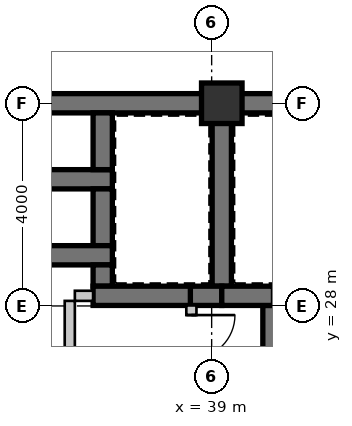
"""IFC4 building model, lengths in metres.
Left out: names, types, materials, properties, quantities, classifications, styles, units other than length and angle.
Written with IfcOpenShell. Run it as: python <this file> out.ifc"""

import sys

from ifc_helpers import new_model, si_unit, direction, frame, frame_2d, origin, origin_2d, place, context, subcontext, project, spatial, rectangle, extrude, source, transform, mapped, element, fill, save


model = new_model("IFC4")
c1 = context("Model", 3, precision=1e-05, world=origin(), true_north=direction((0.0, 1.0)))
c2 = subcontext(c1, "Body", "Model", "MODEL_VIEW")
j1 = project(units=[si_unit("LENGTHUNIT", "METRE"), si_unit("PLANEANGLEUNIT", "RADIAN")], contexts=[c1])
p1 = place(None, origin())
s1 = spatial("IfcSite", under=j1, at=p1, CompositionType="ELEMENT")
p2 = place(p1, origin())
s2 = spatial("IfcBuilding", under=s1, at=p2, CompositionType="ELEMENT")
p3 = place(p2, frame((0.0, 0.0, 26.25)))
s3 = spatial("IfcBuildingStorey", under=s2, at=p3, CompositionType="ELEMENT", Elevation=26.25)
m1 = source(origin(), c2, "Body", "SweptSolid", [
    extrude(rectangle(XDim=0.8, YDim=0.8, at=origin_2d()), origin(), (0.0, 0.0, 1.0), 3.15),
])
p4 = place(p3, frame((39.2, 32.0, 0.0), z_axis=(0.0, 0.0, 1.0), x_axis=(1.0, 0.0, 0.0)))
e1 = element("IfcColumn", 1, at=p4, inside=s3, PredefinedType="COLUMN", context=c2, shape_type="MappedRepresentation", body=[
    mapped(m1, transform((0.0, 0.0, 0.0), scale=1.0)),
])
m2 = source(origin(), c2, "Body", "SweptSolid", [
    extrude(rectangle(XDim=11.2, YDim=0.38, at=frame_2d((5.6, 0.0))), origin(), (0.0, 0.0, 1.0), 2.93),
])
p5 = place(p3, frame((28.0, 32.0, 0.0), z_axis=(0.0, 0.0, 1.0), x_axis=(1.0, 0.0, 0.0)))
e2 = element("IfcWall", 2, at=p5, inside=s3, PredefinedType="SHEAR", context=c2, shape_type="MappedRepresentation", body=[
    mapped(m2, transform((0.0, 0.0, 0.0), scale=1.0)),
])
m3 = source(origin(), c2, "Body", "SweptSolid", [
    extrude(rectangle(XDim=11.99, YDim=0.38, at=frame_2d((5.995, 0.0))), origin(), (0.0, 0.0, 1.0), 2.93),
])
p6 = place(p3, frame((39.2, 32.0, 0.0), z_axis=(0.0, 0.0, 1.0), x_axis=(1.0, 0.0, 0.0)))
e3 = element("IfcWall", 3, at=p6, inside=s3, PredefinedType="SHEAR", context=c2, shape_type="MappedRepresentation", body=[
    mapped(m3, transform((0.0, 0.0, 0.0), scale=1.0)),
])
m4 = source(origin(), c2, "Body", "SweptSolid", [
    extrude(rectangle(XDim=2.08, YDim=0.38, at=frame_2d((1.04, 0.0))), origin(), (0.0, 0.0, 1.0), 2.93),
])
p7 = place(p3, frame((34.96, 30.5, 0.0), z_axis=(0.0, 0.0, 1.0), x_axis=(1.0, 0.0, 0.0)))
e4 = element("IfcWall", 4, at=p7, inside=s3, PredefinedType="SHEAR", context=c2, shape_type="MappedRepresentation", body=[
    mapped(m4, transform((0.0, 0.0, 0.0), scale=1.0)),
])
m5 = source(origin(), c2, "Body", "SweptSolid", [
    extrude(rectangle(XDim=1.12, YDim=0.38, at=frame_2d((0.56, 0.0))), origin(), (0.0, 0.0, 1.0), 2.93),
])
for number, where, z_axis, x_axis in (
    (5, (36.85, 30.69, 0.0), (0.0, 0.0, 1.0), (0.0, 1.0, 0.0)),
    (6, (36.85, 29.19, 0.0), (0.0, 0.0, 1.0), (0.0, 1.0, 0.0)),
):
    element("IfcWall", number, at=place(p3, frame(where, z_axis=z_axis, x_axis=x_axis)), inside=s3, PredefinedType="SHEAR", context=c2, shape_type="MappedRepresentation", body=[
        mapped(m5, transform((0.0, 0.0, 0.0), scale=1.0)),
    ])
p8 = place(p3, frame((34.96, 29.0, 0.0), z_axis=(0.0, 0.0, 1.0), x_axis=(1.0, 0.0, 0.0)))
e7 = element("IfcWall", 7, at=p8, inside=s3, PredefinedType="SHEAR", context=c2, shape_type="MappedRepresentation", body=[
    mapped(m4, transform((0.0, 0.0, 0.0), scale=1.0)),
])
m6 = source(origin(), c2, "Body", "SweptSolid", [
    extrude(rectangle(XDim=1.32, YDim=0.38, at=frame_2d((0.66, 0.0))), origin(), (0.0, 0.0, 1.0), 2.93),
])
p9 = place(p3, frame((41.52, 28.2, 0.0), z_axis=(0.0, 0.0, 1.0), x_axis=(-1.0, 0.0, 0.0)))
e8 = element("IfcWall", 8, at=p9, inside=s3, PredefinedType="SHEAR", context=c2, shape_type="MappedRepresentation", body=[
    mapped(m6, transform((0.0, 0.0, 0.0), scale=1.0)),
])
m7 = source(origin(), c2, "Body", "SweptSolid", [
    extrude(rectangle(XDim=1.22, YDim=0.38, at=frame_2d((0.61, 0.0))), origin(), (0.0, 0.0, 1.0), 2.93),
])
p10 = place(p3, frame((40.2, 28.01, 0.0), z_axis=(0.0, 0.0, 1.0), x_axis=(0.0, -1.0, 0.0)))
e9 = element("IfcWall", 9, at=p10, inside=s3, PredefinedType="SHEAR", context=c2, shape_type="MappedRepresentation", body=[
    mapped(m7, transform((0.0, 0.0, 0.0), scale=1.0)),
])
m8 = source(origin(), c2, "Body", "SweptSolid", [
    extrude(rectangle(XDim=3.42, YDim=0.38, at=frame_2d((1.71, 0.0))), origin(), (0.0, 0.0, 1.0), 2.93),
])
p11 = place(p3, frame((39.2, 28.39, 0.0), z_axis=(0.0, 0.0, 1.0), x_axis=(0.0, 1.0, 0.0)))
e10 = element("IfcWall", 10, at=p11, inside=s3, PredefinedType="SHEAR", context=c2, shape_type="MappedRepresentation", body=[
    mapped(m8, transform((0.0, 0.0, 0.0), scale=1.0)),
])
m9 = source(origin(), c2, "Body", "SweptSolid", [
    extrude(rectangle(XDim=0.42, YDim=0.38, at=frame_2d((0.21, 0.0))), origin(), (0.0, 0.0, 1.0), 2.93),
])
p12 = place(p3, frame((36.85, 28.81, 0.0), z_axis=(0.0, 0.0, 1.0), x_axis=(0.0, -1.0, 0.0)))
e11 = element("IfcWall", 11, at=p12, inside=s3, PredefinedType="SHEAR", context=c2, shape_type="MappedRepresentation", body=[
    mapped(m9, transform((0.0, 0.0, 0.0), scale=1.0)),
])
m10 = source(origin(), c2, "Body", "SweptSolid", [
    extrude(rectangle(XDim=1.96, YDim=0.38, at=frame_2d((0.98, 0.0))), origin(), (0.0, 0.0, 1.0), 2.93),
])
p13 = place(p3, frame((36.66, 28.2, 0.0), z_axis=(0.0, 0.0, 1.0), x_axis=(1.0, 0.0, 0.0)))
e12 = element("IfcWall", 12, at=p13, inside=s3, PredefinedType="SHEAR", context=c2, shape_type="MappedRepresentation", body=[
    mapped(m10, transform((0.0, 0.0, 0.0), scale=1.0)),
])
m11 = source(origin(), c2, "Body", "SweptSolid", [
    extrude(rectangle(XDim=0.62, YDim=0.38, at=frame_2d((0.31, 0.0))), origin(), (0.0, 0.0, 1.0), 2.93),
])
p14 = place(p3, frame((38.58, 28.2, 0.0), z_axis=(0.0, 0.0, 1.0), x_axis=(1.0, 0.0, 0.0)))
e13 = element("IfcWall", 13, at=p14, inside=s3, PredefinedType="SHEAR", context=c2, shape_type="MappedRepresentation", body=[
    mapped(m11, transform((0.0, 0.0, 0.0), scale=1.0)),
])
m12 = source(origin(), c2, "Body", "SweptSolid", [
    extrude(rectangle(XDim=1.02, YDim=0.38, at=frame_2d((0.51, 0.0))), origin(), (0.0, 0.0, 1.0), 2.93),
])
p15 = place(p3, frame((39.2, 28.2, 0.0), z_axis=(0.0, 0.0, 1.0), x_axis=(1.0, 0.0, 0.0)))
e14 = element("IfcWall", 14, at=p15, inside=s3, PredefinedType="SHEAR", context=c2, shape_type="MappedRepresentation", body=[
    mapped(m12, transform((0.0, 0.0, 0.0), scale=1.0)),
])
m13 = source(origin(), c2, "Body", "SweptSolid", [
    extrude(rectangle(XDim=1.9, YDim=0.2, at=frame_2d((0.95, 0.0))), origin(), (0.0, 0.0, 1.0), 2.93),
])
p16 = place(p3, frame((36.2, 28.1, 0.0), z_axis=(0.0, 0.0, 1.0), x_axis=(0.0, -1.0, 0.0)))
e15 = element("IfcWall", 15, at=p16, inside=s3, PredefinedType="SOLIDWALL", context=c2, shape_type="MappedRepresentation", body=[
    mapped(m13, transform((0.0, 0.0, 0.0), scale=1.0)),
])
m14 = source(origin(), c2, "Body", "SweptSolid", [
    extrude(rectangle(XDim=0.36, YDim=0.2, at=frame_2d((0.18, 0.0))), origin(), (0.0, 0.0, 1.0), 2.93),
])
p17 = place(p3, frame((36.66, 28.2, 0.0), z_axis=(0.0, 0.0, 1.0), x_axis=(-1.0, 0.0, 0.0)))
e16 = element("IfcWall", 16, at=p17, inside=s3, PredefinedType="SOLIDWALL", context=c2, shape_type="MappedRepresentation", body=[
    mapped(m14, transform((0.0, 0.0, 0.0), scale=1.0)),
])
m15 = source(origin(), c2, "Body", "SweptSolid", [
    extrude(rectangle(XDim=1.43, YDim=0.2, at=frame_2d((0.715, 0.0))), origin(), (0.0, 0.0, 1.0), 2.93),
])
p18 = place(p3, frame((38.6, 28.01, 0.0), z_axis=(0.0, 0.0, 1.0), x_axis=(0.0, -1.0, 0.0)))
e17 = element("IfcWall", 17, at=p18, inside=s3, PredefinedType="SOLIDWALL", context=c2, shape_type="MappedRepresentation", body=[
    mapped(m15, transform((0.0, 0.0, 0.0), scale=1.0)),
])
m16 = source(origin(), c2, "Body", "SweptSolid", [
    extrude(rectangle(XDim=0.86, YDim=2.1, at=frame_2d((0.43, 1.05))), frame((0.0, 0.11, 0.0), z_axis=(0.0, -1.0, 0.0), x_axis=(1.0, 0.0, 0.0)), (0.0, 0.0, 1.0), 0.22),
])
p19 = place(p18, frame((0.19, 0.0, 0.0)))
e18 = element("IfcOpeningElement", 18, at=p19, cuts=e17, PredefinedType="OPENING", context=c2, shape_type="MappedRepresentation", body=[
    mapped(m16, transform((0.0, 0.0, 0.0), scale=1.0)),
])
m17 = source(origin(), c2, "Body", "SweptSolid", [
    extrude(rectangle(XDim=0.86, YDim=2.1, at=frame_2d((0.43, 1.05))), frame((0.0, 0.025, 0.0), z_axis=(0.0, -1.0, 0.0), x_axis=(1.0, 0.0, 0.0)), (0.0, 0.0, 1.0), 0.05),
])
p20 = place(p19, origin())
e19 = element("IfcDoor", 19, at=p20, inside=s3, OperationType="SINGLE_SWING_LEFT", PredefinedType="DOOR", context=c2, shape_type="MappedRepresentation", body=[
    mapped(m17, transform((0.0, 0.0, 0.0), scale=1.0)),
])
fill(e18, e19)
save(model, sys.argv[1])
